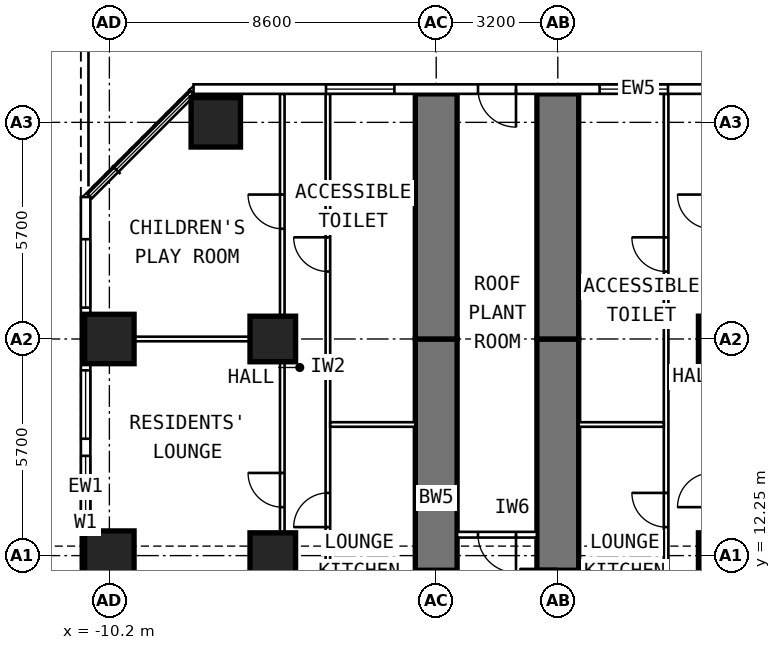
"""IFC4 building model, lengths in metres.
Left out: names, types, materials, properties, quantities, classifications, styles, units other than length and angle.
Written with IfcOpenShell. Run it as: python <this file> out.ifc"""

import sys

from ifc_helpers import new_model, si_unit, direction, frame, frame_2d, origin, origin_2d, place, context, subcontext, project, spatial, rectangle, extrude, element, fill, save


model = new_model("IFC4")
c1 = context("Model", 3, precision=1e-05, world=origin(), true_north=direction((0.0, 1.0)))
c2 = subcontext(c1, "Body", "Model", "MODEL_VIEW")
j1 = project(units=[si_unit("LENGTHUNIT", "METRE"), si_unit("PLANEANGLEUNIT", "RADIAN")], contexts=[c1])
p1 = place(None, origin())
s1 = spatial("IfcSite", under=j1, at=p1, CompositionType="ELEMENT")
p2 = place(p1, origin())
s2 = spatial("IfcBuilding", under=s1, at=p2, CompositionType="ELEMENT")
p3 = place(p2, frame((0.0, 0.0, 120.2)))
s3 = spatial("IfcBuildingStorey", under=s2, at=p3, CompositionType="ELEMENT", Elevation=120.2)
for number, where, z_axis, x_axis in (
    (1, (-10.2, 12.25, 0.0), (0.0, 0.0, 1.0), (0.0, 1.0, 0.0)),
    (2, (-10.2, 17.95, 0.0), (0.0, 0.0, 1.0), (0.0, 1.0, 0.0)),
    (3, (-7.4, 23.65, 0.0), (0.0, 0.0, 1.0), (0.0, 1.0, 0.0)),
):
    element("IfcColumn", number, at=place(p3, frame(where, z_axis=z_axis, x_axis=x_axis)), inside=s3, PredefinedType="COLUMN", context=c2, shape_type="SweptSolid", body=[
        extrude(rectangle(XDim=1.3, YDim=1.3, at=origin_2d()), origin(), (0.0, 0.0, 1.0), 3.6),
    ])
for number, where, z_axis, x_axis in (
    (4, (-5.9, 12.25, 0.0), (0.0, 0.0, 1.0), (0.0, 1.0, 0.0)),
    (5, (-5.9, 17.95, 0.0), (0.0, 0.0, 1.0), (0.0, 1.0, 0.0)),
    (6, (5.9, 12.25, 0.0), (0.0, 0.0, 1.0), (0.0, 1.0, 0.0)),
    (7, (5.9, 17.95, 0.0), (0.0, 0.0, 1.0), (0.0, 1.0, 0.0)),
):
    element("IfcColumn", number, at=place(p3, frame(where, z_axis=z_axis, x_axis=x_axis)), inside=s3, PredefinedType="COLUMN", context=c2, shape_type="SweptSolid", body=[
        extrude(rectangle(XDim=1.2, YDim=1.2, at=origin_2d()), origin(), (0.0, 0.0, 1.0), 3.6),
    ])
p4 = place(p3, frame((-1.6, 9.6, 0.0), z_axis=(0.0, 0.0, 1.0), x_axis=(0.0, 1.0, 0.0)))
e8 = element("IfcWall", 8, at=p4, inside=s3, PredefinedType="SHEAR", context=c2, shape_type="SweptSolid", body=[
    extrude(rectangle(XDim=8.35, YDim=1.1, at=frame_2d((4.175, 0.0))), origin(), (0.0, 0.0, 1.0), 3.6),
])
p5 = place(p4, frame((1.3, 0.0, 0.0)))
e9 = element("IfcOpeningElement", 9, at=p5, cuts=e8, PredefinedType="OPENING", context=c2, shape_type="SweptSolid", body=[
    extrude(rectangle(XDim=1.0, YDim=2.1, at=frame_2d((0.5, 1.05))), frame((0.0, 0.562, 0.0), z_axis=(0.0, -1.0, 0.0), x_axis=(1.0, 0.0, 0.0)), (0.0, 0.0, 1.0), 1.124),
])
p6 = place(p3, frame((-1.6, 17.95, 0.0), z_axis=(0.0, 0.0, 1.0), x_axis=(0.0, 1.0, 0.0)))
e10 = element("IfcWall", 10, at=p6, inside=s3, PredefinedType="SHEAR", context=c2, shape_type="SweptSolid", body=[
    extrude(rectangle(XDim=6.45, YDim=1.1, at=frame_2d((3.225, 0.0))), origin(), (0.0, 0.0, 1.0), 3.6),
])
p7 = place(p3, frame((1.6, 9.6, 0.0), z_axis=(0.0, 0.0, 1.0), x_axis=(0.0, 1.0, 0.0)))
e11 = element("IfcWall", 11, at=p7, inside=s3, PredefinedType="SHEAR", context=c2, shape_type="SweptSolid", body=[
    extrude(rectangle(XDim=8.35, YDim=1.1, at=frame_2d((4.175, 0.0))), origin(), (0.0, 0.0, 1.0), 3.6),
])
p8 = place(p7, frame((1.3, 0.0, 0.0)))
e12 = element("IfcOpeningElement", 12, at=p8, cuts=e11, PredefinedType="OPENING", context=c2, shape_type="SweptSolid", body=[
    extrude(rectangle(XDim=1.0, YDim=2.1, at=frame_2d((0.5, 1.05))), frame((0.0, 0.562, 0.0), z_axis=(0.0, -1.0, 0.0), x_axis=(1.0, 0.0, 0.0)), (0.0, 0.0, 1.0), 1.124),
])
p9 = place(p3, frame((1.6, 17.95, 0.0), z_axis=(0.0, 0.0, 1.0), x_axis=(0.0, 1.0, 0.0)))
e13 = element("IfcWall", 13, at=p9, inside=s3, PredefinedType="SHEAR", context=c2, shape_type="SweptSolid", body=[
    extrude(rectangle(XDim=6.45, YDim=1.1, at=frame_2d((3.225, 0.0))), origin(), (0.0, 0.0, 1.0), 3.6),
])
p10 = place(p3, frame((7.985, 24.525, 0.0), z_axis=(0.0, 0.0, 1.0), x_axis=(-1.0, 0.0, 0.0)))
e14 = element("IfcWall", 14, at=p10, inside=s3, PredefinedType="SOLIDWALL", context=c2, shape_type="SweptSolid", body=[
    extrude(rectangle(XDim=15.971, YDim=0.25, at=frame_2d((7.985, 0.0))), origin(), (0.0, 0.0, 1.0), 3.35),
])
p11 = place(p10, frame((7.485, 0.0, 0.0)))
e15 = element("IfcOpeningElement", 15, at=p11, cuts=e14, PredefinedType="OPENING", context=c2, shape_type="SweptSolid", body=[
    extrude(rectangle(XDim=1.0, YDim=2.4, at=frame_2d((0.5, 1.2))), frame((0.0, 0.137, 0.0), z_axis=(0.0, -1.0, 0.0), x_axis=(1.0, 0.0, 0.0)), (0.0, 0.0, 1.0), 0.274),
])
p12 = place(p10, frame((3.485, 0.0, 0.8)))
e16 = element("IfcOpeningElement", 16, at=p12, cuts=e14, PredefinedType="OPENING", context=c2, shape_type="SweptSolid", body=[
    extrude(rectangle(XDim=1.8, YDim=1.8, at=frame_2d((0.9, 0.9))), frame((0.0, 0.137, 0.0), z_axis=(0.0, -1.0, 0.0), x_axis=(1.0, 0.0, 0.0)), (0.0, 0.0, 1.0), 0.274),
])
p13 = place(p10, frame((10.685, 0.0, 0.8)))
e17 = element("IfcOpeningElement", 17, at=p13, cuts=e14, PredefinedType="OPENING", context=c2, shape_type="SweptSolid", body=[
    extrude(rectangle(XDim=1.8, YDim=1.8, at=frame_2d((0.9, 0.9))), frame((0.0, 0.137, 0.0), z_axis=(0.0, -1.0, 0.0), x_axis=(1.0, 0.0, 0.0)), (0.0, 0.0, 1.0), 0.274),
])
p14 = place(p3, frame((-10.825, 6.409, 0.0), z_axis=(0.0, 0.0, 1.0), x_axis=(0.0, 1.0, 0.0)))
e18 = element("IfcWall", 18, at=p14, inside=s3, PredefinedType="SOLIDWALL", context=c2, shape_type="SweptSolid", body=[
    extrude(rectangle(XDim=15.276, YDim=0.25, at=frame_2d((7.638, 0.0))), origin(), (0.0, 0.0, 1.0), 3.35),
])
p15 = place(p14, frame((0.966, 0.0, 0.8)))
e19 = element("IfcOpeningElement", 19, at=p15, cuts=e18, PredefinedType="OPENING", context=c2, shape_type="SweptSolid", body=[
    extrude(rectangle(XDim=1.8, YDim=1.8, at=frame_2d((0.9, 0.9))), frame((0.0, 0.137, 0.0), z_axis=(0.0, -1.0, 0.0), x_axis=(1.0, 0.0, 0.0)), (0.0, 0.0, 1.0), 0.274),
])
p16 = place(p14, frame((3.216, 0.0, 0.8)))
e20 = element("IfcOpeningElement", 20, at=p16, cuts=e18, PredefinedType="OPENING", context=c2, shape_type="SweptSolid", body=[
    extrude(rectangle(XDim=1.8, YDim=1.8, at=frame_2d((0.9, 0.9))), frame((0.0, 0.137, 0.0), z_axis=(0.0, -1.0, 0.0), x_axis=(1.0, 0.0, 0.0)), (0.0, 0.0, 1.0), 0.274),
])
p17 = place(p14, frame((6.666, 0.0, 0.8)))
e21 = element("IfcOpeningElement", 21, at=p17, cuts=e18, PredefinedType="OPENING", context=c2, shape_type="SweptSolid", body=[
    extrude(rectangle(XDim=1.8, YDim=1.8, at=frame_2d((0.9, 0.9))), frame((0.0, 0.137, 0.0), z_axis=(0.0, -1.0, 0.0), x_axis=(1.0, 0.0, 0.0)), (0.0, 0.0, 1.0), 0.274),
])
p18 = place(p14, frame((8.916, 0.0, 0.8)))
e22 = element("IfcOpeningElement", 22, at=p18, cuts=e18, PredefinedType="OPENING", context=c2, shape_type="SweptSolid", body=[
    extrude(rectangle(XDim=1.8, YDim=1.8, at=frame_2d((0.9, 0.9))), frame((0.0, 0.137, 0.0), z_axis=(0.0, -1.0, 0.0), x_axis=(1.0, 0.0, 0.0)), (0.0, 0.0, 1.0), 0.274),
])
p19 = place(p14, frame((12.366, 0.0, 0.8)))
e23 = element("IfcOpeningElement", 23, at=p19, cuts=e18, PredefinedType="OPENING", context=c2, shape_type="SweptSolid", body=[
    extrude(rectangle(XDim=1.8, YDim=1.8, at=frame_2d((0.9, 0.9))), frame((0.0, 0.137, 0.0), z_axis=(0.0, -1.0, 0.0), x_axis=(1.0, 0.0, 0.0)), (0.0, 0.0, 1.0), 0.274),
])
p20 = place(p3, frame((-4.45, 10.05, 0.0), z_axis=(0.0, 0.0, 1.0), x_axis=(0.0, 1.0, 0.0)))
e24 = element("IfcWall", 24, at=p20, inside=s3, PredefinedType="PARTITIONING", context=c2, shape_type="SweptSolid", body=[
    extrude(rectangle(XDim=14.35, YDim=0.12, at=frame_2d((7.175, 0.0))), origin(), (0.0, 0.0, 1.0), 3.35),
])
p21 = place(p20, frame((2.95, 0.0, 0.0)))
e25 = element("IfcOpeningElement", 25, at=p21, cuts=e24, PredefinedType="OPENING", context=c2, shape_type="SweptSolid", body=[
    extrude(rectangle(XDim=0.9, YDim=2.1, at=frame_2d((0.45, 1.05))), frame((0.0, 0.072, 0.0), z_axis=(0.0, -1.0, 0.0), x_axis=(1.0, 0.0, 0.0)), (0.0, 0.0, 1.0), 0.144),
])
p22 = place(p20, frame((9.675, 0.0, 0.0)))
e26 = element("IfcOpeningElement", 26, at=p22, cuts=e24, PredefinedType="OPENING", context=c2, shape_type="SweptSolid", body=[
    extrude(rectangle(XDim=0.9, YDim=2.1, at=frame_2d((0.45, 1.05))), frame((0.0, 0.072, 0.0), z_axis=(0.0, -1.0, 0.0), x_axis=(1.0, 0.0, 0.0)), (0.0, 0.0, 1.0), 0.144),
])
p23 = place(p3, frame((-5.65, 9.6, 0.0), z_axis=(0.0, 0.0, 1.0), x_axis=(0.0, 1.0, 0.0)))
e27 = element("IfcWall", 27, at=p23, inside=s3, PredefinedType="PARTITIONING", context=c2, shape_type="SweptSolid", body=[
    extrude(rectangle(XDim=14.8, YDim=0.12, at=frame_2d((7.4, 0.0))), origin(), (0.0, 0.0, 1.0), 3.35),
])
p24 = place(p23, frame((3.925, 0.0, 0.0)))
e28 = element("IfcOpeningElement", 28, at=p24, cuts=e27, PredefinedType="OPENING", context=c2, shape_type="SweptSolid", body=[
    extrude(rectangle(XDim=0.9, YDim=2.1, at=frame_2d((0.45, 1.05))), frame((0.0, 0.072, 0.0), z_axis=(0.0, -1.0, 0.0), x_axis=(1.0, 0.0, 0.0)), (0.0, 0.0, 1.0), 0.144),
])
p25 = place(p23, frame((11.25, 0.0, 0.0)))
e29 = element("IfcOpeningElement", 29, at=p25, cuts=e27, PredefinedType="OPENING", context=c2, shape_type="SweptSolid", body=[
    extrude(rectangle(XDim=0.9, YDim=2.1, at=frame_2d((0.45, 1.05))), frame((0.0, 0.072, 0.0), z_axis=(0.0, -1.0, 0.0), x_axis=(1.0, 0.0, 0.0)), (0.0, 0.0, 1.0), 0.144),
])
p26 = place(p3, frame((-5.71, 17.95, 0.0), z_axis=(0.0, 0.0, 1.0), x_axis=(-1.0, 0.0, 0.0)))
e30 = element("IfcWall", 30, at=p26, inside=s3, PredefinedType="PARTITIONING", context=c2, shape_type="SweptSolid", body=[
    extrude(rectangle(XDim=4.99, YDim=0.12, at=frame_2d((2.495, 0.0))), origin(), (0.0, 0.0, 1.0), 2.45),
])
p27 = place(p3, frame((-2.15, 15.7, 0.0), z_axis=(0.0, 0.0, 1.0), x_axis=(-1.0, 0.0, 0.0)))
e31 = element("IfcWall", 31, at=p27, inside=s3, PredefinedType="PARTITIONING", context=c2, shape_type="SweptSolid", body=[
    extrude(rectangle(XDim=2.24, YDim=0.12, at=frame_2d((1.12, 0.0))), origin(), (0.0, 0.0, 1.0), 3.35),
])
p28 = place(p3, frame((4.45, 10.05, 0.0), z_axis=(0.0, 0.0, 1.0), x_axis=(0.0, 1.0, 0.0)))
e32 = element("IfcWall", 32, at=p28, inside=s3, PredefinedType="PARTITIONING", context=c2, shape_type="SweptSolid", body=[
    extrude(rectangle(XDim=14.35, YDim=0.12, at=frame_2d((7.175, 0.0))), origin(), (0.0, 0.0, 1.0), 3.35),
])
p29 = place(p28, frame((2.95, 0.0, 0.0)))
e33 = element("IfcOpeningElement", 33, at=p29, cuts=e32, PredefinedType="OPENING", context=c2, shape_type="SweptSolid", body=[
    extrude(rectangle(XDim=0.9, YDim=2.1, at=frame_2d((0.45, 1.05))), frame((0.0, 0.072, 0.0), z_axis=(0.0, -1.0, 0.0), x_axis=(1.0, 0.0, 0.0)), (0.0, 0.0, 1.0), 0.144),
])
p30 = place(p28, frame((9.675, 0.0, 0.0)))
e34 = element("IfcOpeningElement", 34, at=p30, cuts=e32, PredefinedType="OPENING", context=c2, shape_type="SweptSolid", body=[
    extrude(rectangle(XDim=0.9, YDim=2.1, at=frame_2d((0.45, 1.05))), frame((0.0, 0.072, 0.0), z_axis=(0.0, -1.0, 0.0), x_axis=(1.0, 0.0, 0.0)), (0.0, 0.0, 1.0), 0.144),
])
p31 = place(p3, frame((2.15, 15.7, 0.0), z_axis=(0.0, 0.0, 1.0), x_axis=(1.0, 0.0, 0.0)))
e35 = element("IfcWall", 35, at=p31, inside=s3, PredefinedType="PARTITIONING", context=c2, shape_type="SweptSolid", body=[
    extrude(rectangle(XDim=2.24, YDim=0.12, at=frame_2d((1.12, 0.0))), origin(), (0.0, 0.0, 1.0), 3.35),
])
p32 = place(p3, frame((1.05, 12.8, 0.0), z_axis=(0.0, 0.0, 1.0), x_axis=(-1.0, 0.0, 0.0)))
e36 = element("IfcWall", 36, at=p32, inside=s3, PredefinedType="PARTITIONING", context=c2, shape_type="SweptSolid", body=[
    extrude(rectangle(XDim=2.1, YDim=0.15, at=frame_2d((1.05, 0.0))), origin(), (0.0, 0.0, 1.0), 3.35),
])
p33 = place(p32, frame((0.55, 0.0, 0.0)))
e37 = element("IfcOpeningElement", 37, at=p33, cuts=e36, PredefinedType="OPENING", context=c2, shape_type="SweptSolid", body=[
    extrude(rectangle(XDim=1.0, YDim=2.1, at=frame_2d((0.5, 1.05))), frame((0.0, 0.087, 0.0), z_axis=(0.0, -1.0, 0.0), x_axis=(1.0, 0.0, 0.0)), (0.0, 0.0, 1.0), 0.174),
])
p34 = place(p11, origin())
e38 = element("IfcDoor", 38, at=p34, inside=s3, OperationType="SINGLE_SWING_LEFT", PredefinedType="DOOR", context=c2, shape_type="SweptSolid", body=[
    extrude(rectangle(XDim=1.0, YDim=2.4, at=frame_2d((0.5, 1.2))), frame((0.0, 0.025, 0.0), z_axis=(0.0, -1.0, 0.0), x_axis=(1.0, 0.0, 0.0)), (0.0, 0.0, 1.0), 0.05),
])
fill(e15, e38)
p35 = place(p12, origin())
e39 = element("IfcWindow", 39, at=p35, inside=s3, PartitioningType="SINGLE_PANEL", PredefinedType="WINDOW", context=c2, shape_type="SweptSolid", body=[
    extrude(rectangle(XDim=1.8, YDim=1.8, at=frame_2d((0.9, 0.9))), frame((0.0, 0.03, 0.0), z_axis=(0.0, -1.0, 0.0), x_axis=(1.0, 0.0, 0.0)), (0.0, 0.0, 1.0), 0.06),
])
fill(e16, e39)
p36 = place(p13, origin())
e40 = element("IfcWindow", 40, at=p36, inside=s3, PartitioningType="SINGLE_PANEL", PredefinedType="WINDOW", context=c2, shape_type="SweptSolid", body=[
    extrude(rectangle(XDim=1.8, YDim=1.8, at=frame_2d((0.9, 0.9))), frame((0.0, 0.03, 0.0), z_axis=(0.0, -1.0, 0.0), x_axis=(1.0, 0.0, 0.0)), (0.0, 0.0, 1.0), 0.06),
])
fill(e17, e40)
p37 = place(p17, origin())
e41 = element("IfcWindow", 41, at=p37, inside=s3, PartitioningType="SINGLE_PANEL", PredefinedType="WINDOW", context=c2, shape_type="SweptSolid", body=[
    extrude(rectangle(XDim=1.8, YDim=1.8, at=frame_2d((0.9, 0.9))), frame((0.0, 0.03, 0.0), z_axis=(0.0, -1.0, 0.0), x_axis=(1.0, 0.0, 0.0)), (0.0, 0.0, 1.0), 0.06),
])
fill(e21, e41)
p38 = place(p18, origin())
e42 = element("IfcWindow", 42, at=p38, inside=s3, PartitioningType="SINGLE_PANEL", PredefinedType="WINDOW", context=c2, shape_type="SweptSolid", body=[
    extrude(rectangle(XDim=1.8, YDim=1.8, at=frame_2d((0.9, 0.9))), frame((0.0, 0.03, 0.0), z_axis=(0.0, -1.0, 0.0), x_axis=(1.0, 0.0, 0.0)), (0.0, 0.0, 1.0), 0.06),
])
fill(e22, e42)
p39 = place(p19, origin())
e43 = element("IfcWindow", 43, at=p39, inside=s3, PartitioningType="SINGLE_PANEL", PredefinedType="WINDOW", context=c2, shape_type="SweptSolid", body=[
    extrude(rectangle(XDim=1.8, YDim=1.8, at=frame_2d((0.9, 0.9))), frame((0.0, 0.03, 0.0), z_axis=(0.0, -1.0, 0.0), x_axis=(1.0, 0.0, 0.0)), (0.0, 0.0, 1.0), 0.06),
])
fill(e23, e43)
p40 = place(p5, origin())
e44 = element("IfcDoor", 44, at=p40, inside=s3, OperationType="SINGLE_SWING_LEFT", PredefinedType="DOOR", context=c2, shape_type="SweptSolid", body=[
    extrude(rectangle(XDim=1.0, YDim=2.1, at=frame_2d((0.5, 1.05))), frame((0.0, 0.3, 0.0), z_axis=(0.0, -1.0, 0.0), x_axis=(1.0, 0.0, 0.0)), (0.0, 0.0, 1.0), 0.6),
])
fill(e9, e44)
p41 = place(p24, origin())
e45 = element("IfcDoor", 45, at=p41, inside=s3, OperationType="SINGLE_SWING_RIGHT", PredefinedType="DOOR", context=c2, shape_type="SweptSolid", body=[
    extrude(rectangle(XDim=0.9, YDim=2.1, at=frame_2d((0.45, 1.05))), frame((0.0, 0.025, 0.0), z_axis=(0.0, -1.0, 0.0), x_axis=(1.0, 0.0, 0.0)), (0.0, 0.0, 1.0), 0.05),
])
fill(e28, e45)
p42 = place(p25, origin())
e46 = element("IfcDoor", 46, at=p42, inside=s3, OperationType="SINGLE_SWING_RIGHT", PredefinedType="DOOR", context=c2, shape_type="SweptSolid", body=[
    extrude(rectangle(XDim=0.9, YDim=2.1, at=frame_2d((0.45, 1.05))), frame((0.0, 0.025, 0.0), z_axis=(0.0, -1.0, 0.0), x_axis=(1.0, 0.0, 0.0)), (0.0, 0.0, 1.0), 0.05),
])
fill(e29, e46)
p43 = place(p21, origin())
e47 = element("IfcDoor", 47, at=p43, inside=s3, OperationType="SINGLE_SWING_LEFT", PredefinedType="DOOR", context=c2, shape_type="SweptSolid", body=[
    extrude(rectangle(XDim=0.9, YDim=2.1, at=frame_2d((0.45, 1.05))), frame((0.0, 0.025, 0.0), z_axis=(0.0, -1.0, 0.0), x_axis=(1.0, 0.0, 0.0)), (0.0, 0.0, 1.0), 0.05),
])
fill(e25, e47)
p44 = place(p22, origin())
e48 = element("IfcDoor", 48, at=p44, inside=s3, OperationType="SINGLE_SWING_RIGHT", PredefinedType="DOOR", context=c2, shape_type="SweptSolid", body=[
    extrude(rectangle(XDim=0.9, YDim=2.1, at=frame_2d((0.45, 1.05))), frame((0.0, 0.025, 0.0), z_axis=(0.0, -1.0, 0.0), x_axis=(1.0, 0.0, 0.0)), (0.0, 0.0, 1.0), 0.05),
])
fill(e26, e48)
p45 = place(p8, origin())
e49 = element("IfcDoor", 49, at=p45, inside=s3, OperationType="SINGLE_SWING_RIGHT", PredefinedType="DOOR", context=c2, shape_type="SweptSolid", body=[
    extrude(rectangle(XDim=1.0, YDim=2.1, at=frame_2d((0.5, 1.05))), frame((0.0, 0.3, 0.0), z_axis=(0.0, -1.0, 0.0), x_axis=(1.0, 0.0, 0.0)), (0.0, 0.0, 1.0), 0.6),
])
fill(e12, e49)
p46 = place(p29, origin())
e50 = element("IfcDoor", 50, at=p46, inside=s3, OperationType="SINGLE_SWING_RIGHT", PredefinedType="DOOR", context=c2, shape_type="SweptSolid", body=[
    extrude(rectangle(XDim=0.9, YDim=2.1, at=frame_2d((0.45, 1.05))), frame((0.0, 0.025, 0.0), z_axis=(0.0, -1.0, 0.0), x_axis=(1.0, 0.0, 0.0)), (0.0, 0.0, 1.0), 0.05),
])
fill(e33, e50)
p47 = place(p30, origin())
e51 = element("IfcDoor", 51, at=p47, inside=s3, OperationType="SINGLE_SWING_RIGHT", PredefinedType="DOOR", context=c2, shape_type="SweptSolid", body=[
    extrude(rectangle(XDim=0.9, YDim=2.1, at=frame_2d((0.45, 1.05))), frame((0.0, 0.025, 0.0), z_axis=(0.0, -1.0, 0.0), x_axis=(1.0, 0.0, 0.0)), (0.0, 0.0, 1.0), 0.05),
])
fill(e34, e51)
p48 = place(p33, origin())
e52 = element("IfcDoor", 52, at=p48, inside=s3, OperationType="SINGLE_SWING_LEFT", PredefinedType="DOOR", context=c2, shape_type="SweptSolid", body=[
    extrude(rectangle(XDim=1.0, YDim=2.1, at=frame_2d((0.5, 1.05))), frame((0.0, 0.025, 0.0), z_axis=(0.0, -1.0, 0.0), x_axis=(1.0, 0.0, 0.0)), (0.0, 0.0, 1.0), 0.05),
])
fill(e37, e52)
save(model, sys.argv[1])
